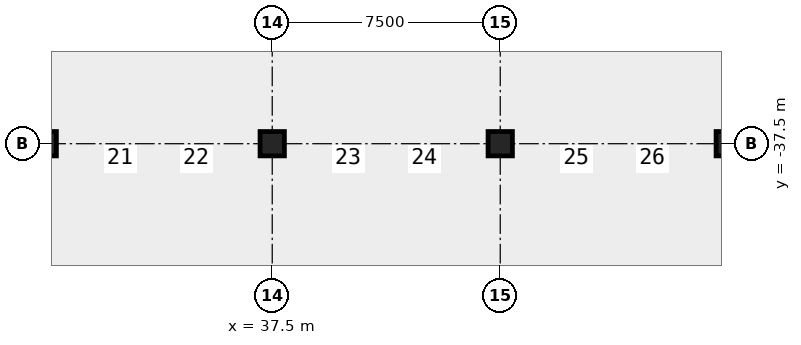
"""IFC4 building model, lengths in metres.
Left out: names, types, materials, properties, quantities, classifications, styles, units other than length and angle.
Written with IfcOpenShell. Run it as: python <this file> out.ifc"""

import sys

from ifc_helpers import new_model, si_unit, direction, frame, origin, origin_2d, place, context, subcontext, project, spatial, rectangle, extrude, element, save


model = new_model("IFC4")
c1 = context("Model", 3, precision=1e-05, world=origin(), true_north=direction((0.0, 1.0)))
c2 = subcontext(c1, "Body", "Model", "MODEL_VIEW")
j1 = project(units=[si_unit("LENGTHUNIT", "METRE"), si_unit("PLANEANGLEUNIT", "RADIAN")], contexts=[c1])
p1 = place(None, origin())
s1 = spatial("IfcSite", under=j1, at=p1, CompositionType="ELEMENT")
p2 = place(p1, origin())
s2 = spatial("IfcBuilding", under=s1, at=p2, CompositionType="ELEMENT")
p3 = place(p2, frame((0.0, 0.0, -5.5)))
s3 = spatial("IfcBuildingStorey", under=s2, at=p3, CompositionType="ELEMENT", Elevation=-5.5)
for number, where, z_axis, x_axis in (
    (1, (30.0, -37.5, -0.42), (0.0, 0.0, 1.0), (1.0, 0.0, 0.0)),
    (2, (37.5, -37.5, -0.42), (0.0, 0.0, 1.0), (1.0, 0.0, 0.0)),
    (3, (45.0, -37.5, -0.42), (0.0, 0.0, 1.0), (1.0, 0.0, 0.0)),
    (4, (52.5, -37.5, -0.42), (0.0, 0.0, 1.0), (1.0, 0.0, 0.0)),
):
    element("IfcColumn", number, at=place(p3, frame(where, z_axis=z_axis, x_axis=x_axis)), inside=s3, PredefinedType="COLUMN", context=c2, shape_type="SweptSolid", body=[
        extrude(rectangle(XDim=0.8, YDim=0.8, at=origin_2d()), origin(), (0.0, 0.0, 1.0), 5.72),
    ])
save(model, sys.argv[1])
